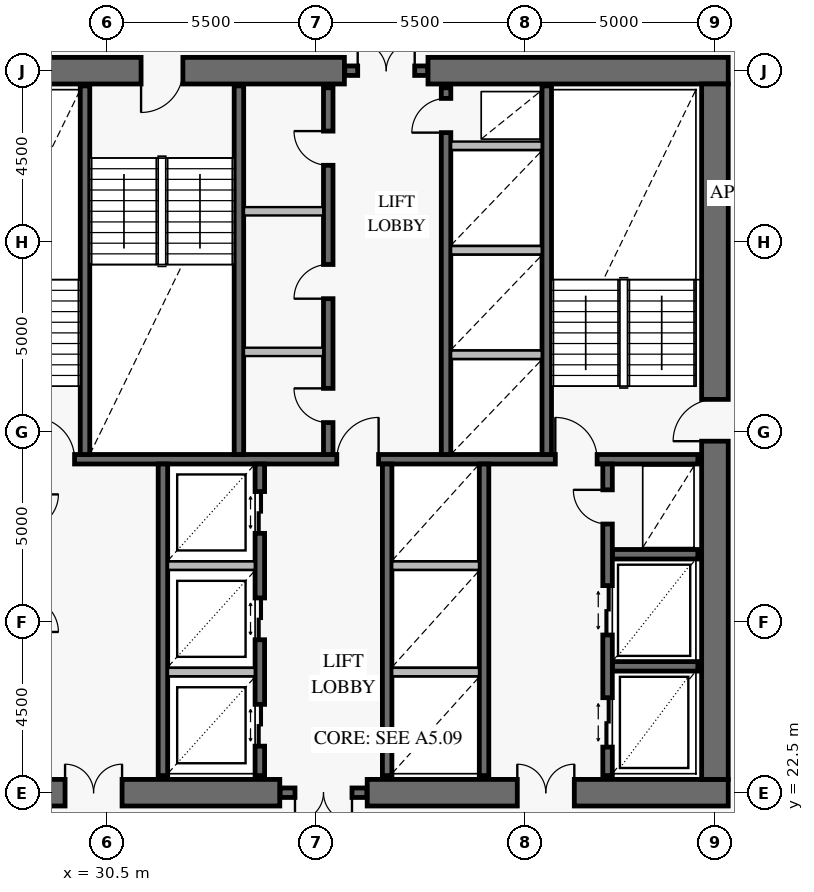
"""IFC4 building model, lengths in metres.
Left out: names, types, materials, properties, quantities, classifications, styles, units other than length and angle.
Written with IfcOpenShell. Run it as: python <this file> out.ifc"""

import sys

from ifc_helpers import new_model, si_unit, direction, frame, frame_2d, origin, place, context, subcontext, project, spatial, rectangle, extrude, element, fill, save


model = new_model("IFC4")
c1 = context("Model", 3, precision=1e-05, world=origin(), true_north=direction((0.0, 1.0)))
c2 = subcontext(c1, "Body", "Model", "MODEL_VIEW")
j1 = project(units=[si_unit("LENGTHUNIT", "METRE"), si_unit("PLANEANGLEUNIT", "RADIAN")], contexts=[c1])
p1 = place(None, origin())
s1 = spatial("IfcSite", under=j1, at=p1, CompositionType="ELEMENT")
p2 = place(p1, origin())
s2 = spatial("IfcBuilding", under=s1, at=p2, CompositionType="ELEMENT")
p3 = place(p2, frame((0.0, 0.0, 103.8)))
s3 = spatial("IfcBuildingStorey", under=s2, at=p3, CompositionType="ELEMENT", Elevation=103.8)
p4 = place(p3, frame((25.15, 22.5, 0.0), z_axis=(0.0, 0.0, 1.0), x_axis=(1.0, 0.0, 0.0)))
e1 = element("IfcWall", 1, at=p4, inside=s3, PredefinedType="SHEAR", context=c2, shape_type="SweptSolid", body=[
    extrude(rectangle(XDim=9.9, YDim=0.7, at=frame_2d((4.95, 0.0))), origin(), (0.0, 0.0, 1.0), 3.8),
])
p5 = place(p4, frame((4.25, 0.0, 0.0)))
e2 = element("IfcOpeningElement", 2, at=p5, cuts=e1, PredefinedType="OPENING", context=c2, shape_type="SweptSolid", body=[
    extrude(rectangle(XDim=1.5, YDim=2.15, at=frame_2d((0.75, 1.075))), frame((0.0, 0.362, 0.0), z_axis=(0.0, -1.0, 0.0), x_axis=(1.0, 0.0, 0.0)), (0.0, 0.0, 1.0), 0.724),
])
p6 = place(p3, frame((37.35, 22.5, 0.0), z_axis=(0.0, 0.0, 1.0), x_axis=(1.0, 0.0, 0.0)))
e3 = element("IfcWall", 3, at=p6, inside=s3, PredefinedType="SHEAR", context=c2, shape_type="SweptSolid", body=[
    extrude(rectangle(XDim=9.5, YDim=0.7, at=frame_2d((4.75, 0.0))), origin(), (0.0, 0.0, 1.0), 3.8),
])
p7 = place(p6, frame((3.95, 0.0, 0.0)))
e4 = element("IfcOpeningElement", 4, at=p7, cuts=e3, PredefinedType="OPENING", context=c2, shape_type="SweptSolid", body=[
    extrude(rectangle(XDim=1.5, YDim=2.15, at=frame_2d((0.75, 1.075))), frame((0.0, 0.362, 0.0), z_axis=(0.0, -1.0, 0.0), x_axis=(1.0, 0.0, 0.0)), (0.0, 0.0, 1.0), 0.724),
])
p8 = place(p3, frame((46.85, 41.5, 0.0), z_axis=(0.0, 0.0, 1.0), x_axis=(-1.0, 0.0, 0.0)))
e5 = element("IfcWall", 5, at=p8, inside=s3, PredefinedType="SHEAR", context=c2, shape_type="SweptSolid", body=[
    extrude(rectangle(XDim=7.9, YDim=0.7, at=frame_2d((3.95, 0.0))), origin(), (0.0, 0.0, 1.0), 3.8),
])
p9 = place(p3, frame((36.75, 41.5, 0.0), z_axis=(0.0, 0.0, 1.0), x_axis=(-1.0, 0.0, 0.0)))
e6 = element("IfcWall", 6, at=p9, inside=s3, PredefinedType="SHEAR", context=c2, shape_type="SweptSolid", body=[
    extrude(rectangle(XDim=11.6, YDim=0.7, at=frame_2d((5.8, 0.0))), origin(), (0.0, 0.0, 1.0), 3.8),
])
p10 = place(p9, frame((4.25, 0.0, 0.0)))
e7 = element("IfcOpeningElement", 7, at=p10, cuts=e6, PredefinedType="OPENING", context=c2, shape_type="SweptSolid", body=[
    extrude(rectangle(XDim=1.1, YDim=2.15, at=frame_2d((0.55, 1.075))), frame((0.0, 0.362, 0.0), z_axis=(0.0, -1.0, 0.0), x_axis=(1.0, 0.0, 0.0)), (0.0, 0.0, 1.0), 0.724),
])
p11 = place(p3, frame((46.5, 22.85, 0.0), z_axis=(0.0, 0.0, 1.0), x_axis=(0.0, 1.0, 0.0)))
e8 = element("IfcWall", 8, at=p11, inside=s3, PredefinedType="SHEAR", context=c2, shape_type="SweptSolid", body=[
    extrude(rectangle(XDim=18.3, YDim=0.7, at=frame_2d((9.15, 0.0))), origin(), (0.0, 0.0, 1.0), 3.8),
])
p12 = place(p11, frame((8.9, 0.0, 0.0)))
e9 = element("IfcOpeningElement", 9, at=p12, cuts=e8, PredefinedType="OPENING", context=c2, shape_type="SweptSolid", body=[
    extrude(rectangle(XDim=1.1, YDim=2.15, at=frame_2d((0.55, 1.075))), frame((0.0, 0.362, 0.0), z_axis=(0.0, -1.0, 0.0), x_axis=(1.0, 0.0, 0.0)), (0.0, 0.0, 1.0), 0.724),
])
p13 = place(p3, frame((35.06, 22.5, 0.0), z_axis=(0.0, 0.0, 1.0), x_axis=(1.0, 0.0, 0.0)))
e10 = element("IfcWall", 10, at=p13, inside=s3, PredefinedType="SOLIDWALL", context=c2, shape_type="SweptSolid", body=[
    extrude(rectangle(XDim=2.28, YDim=0.25, at=frame_2d((1.14, 0.0))), origin(), (0.0, 0.0, 1.0), 3.8),
])
p14 = place(p13, frame((0.39, 0.0, 0.0)))
e11 = element("IfcOpeningElement", 11, at=p14, cuts=e10, PredefinedType="OPENING", context=c2, shape_type="SweptSolid", body=[
    extrude(rectangle(XDim=1.5, YDim=2.15, at=frame_2d((0.75, 1.075))), frame((0.0, 0.137, 0.0), z_axis=(0.0, -1.0, 0.0), x_axis=(1.0, 0.0, 0.0)), (0.0, 0.0, 1.0), 0.274),
])
p15 = place(p3, frame((36.76, 41.5, 0.0), z_axis=(0.0, 0.0, 1.0), x_axis=(1.0, 0.0, 0.0)))
e12 = element("IfcWall", 12, at=p15, inside=s3, PredefinedType="SOLIDWALL", context=c2, shape_type="SweptSolid", body=[
    extrude(rectangle(XDim=2.18, YDim=0.25, at=frame_2d((1.09, 0.0))), origin(), (0.0, 0.0, 1.0), 3.8),
])
p16 = place(p15, frame((0.34, 0.0, 0.0)))
e13 = element("IfcOpeningElement", 13, at=p16, cuts=e12, PredefinedType="OPENING", context=c2, shape_type="SweptSolid", body=[
    extrude(rectangle(XDim=1.5, YDim=2.15, at=frame_2d((0.75, 1.075))), frame((0.0, 0.137, 0.0), z_axis=(0.0, -1.0, 0.0), x_axis=(1.0, 0.0, 0.0)), (0.0, 0.0, 1.0), 0.274),
])
p17 = place(p3, frame((25.95, 31.275, 0.0), z_axis=(0.0, 0.0, 1.0), x_axis=(1.0, 0.0, 0.0)))
e14 = element("IfcWall", 14, at=p17, inside=s3, PredefinedType="SOLIDWALL", context=c2, shape_type="SweptSolid", body=[
    extrude(rectangle(XDim=20.1, YDim=0.25, at=frame_2d((10.05, 0.0))), origin(), (0.0, 0.0, 1.0), 3.8),
])
p18 = place(p17, frame((2.6, 0.0, 0.0)))
e15 = element("IfcOpeningElement", 15, at=p18, cuts=e14, PredefinedType="OPENING", context=c2, shape_type="SweptSolid", body=[
    extrude(rectangle(XDim=1.1, YDim=2.15, at=frame_2d((0.55, 1.075))), frame((0.0, 0.137, 0.0), z_axis=(0.0, -1.0, 0.0), x_axis=(1.0, 0.0, 0.0)), (0.0, 0.0, 1.0), 0.274),
])
p19 = place(p17, frame((10.6, 0.0, 0.0)))
e16 = element("IfcOpeningElement", 16, at=p19, cuts=e14, PredefinedType="OPENING", context=c2, shape_type="SweptSolid", body=[
    extrude(rectangle(XDim=1.1, YDim=2.15, at=frame_2d((0.55, 1.075))), frame((0.0, 0.137, 0.0), z_axis=(0.0, -1.0, 0.0), x_axis=(1.0, 0.0, 0.0)), (0.0, 0.0, 1.0), 0.274),
])
p20 = place(p17, frame((16.35, 0.0, 0.0)))
e17 = element("IfcOpeningElement", 17, at=p20, cuts=e14, PredefinedType="OPENING", context=c2, shape_type="SweptSolid", body=[
    extrude(rectangle(XDim=1.1, YDim=2.15, at=frame_2d((0.55, 1.075))), frame((0.0, 0.137, 0.0), z_axis=(0.0, -1.0, 0.0), x_axis=(1.0, 0.0, 0.0)), (0.0, 0.0, 1.0), 0.274),
])
for number, where, z_axis, x_axis in (
    (18, (29.925, 31.4, 0.0), (0.0, 0.0, 1.0), (0.0, 1.0, 0.0)),
    (19, (33.975, 31.4, 0.0), (0.0, 0.0, 1.0), (0.0, 1.0, 0.0)),
    (20, (42.075, 31.4, 0.0), (0.0, 0.0, 1.0), (0.0, 1.0, 0.0)),
):
    element("IfcWall", number, at=place(p3, frame(where, z_axis=z_axis, x_axis=x_axis)), inside=s3, PredefinedType="SOLIDWALL", context=c2, shape_type="SweptSolid", body=[
        extrude(rectangle(XDim=9.7, YDim=0.25, at=frame_2d((4.85, 0.0))), origin(), (0.0, 0.0, 1.0), 3.8),
    ])
p21 = place(p3, frame((36.325, 31.4, 0.0), z_axis=(0.0, 0.0, 1.0), x_axis=(0.0, 1.0, 0.0)))
e21 = element("IfcWall", 21, at=p21, inside=s3, PredefinedType="SOLIDWALL", context=c2, shape_type="SweptSolid", body=[
    extrude(rectangle(XDim=9.65, YDim=0.25, at=frame_2d((4.825, 0.0))), origin(), (0.0, 0.0, 1.0), 3.8),
])
p22 = place(p21, frame((0.84, 0.0, 0.0)))
e22 = element("IfcOpeningElement", 22, at=p22, cuts=e21, PredefinedType="OPENING", context=c2, shape_type="SweptSolid", body=[
    extrude(rectangle(XDim=0.9, YDim=2.1, at=frame_2d((0.45, 1.05))), frame((0.0, 0.137, 0.0), z_axis=(0.0, -1.0, 0.0), x_axis=(1.0, 0.0, 0.0)), (0.0, 0.0, 1.0), 0.274),
])
p23 = place(p21, frame((4.1, 0.0, 0.0)))
e23 = element("IfcOpeningElement", 23, at=p23, cuts=e21, PredefinedType="OPENING", context=c2, shape_type="SweptSolid", body=[
    extrude(rectangle(XDim=0.9, YDim=2.1, at=frame_2d((0.45, 1.05))), frame((0.0, 0.137, 0.0), z_axis=(0.0, -1.0, 0.0), x_axis=(1.0, 0.0, 0.0)), (0.0, 0.0, 1.0), 0.274),
])
p24 = place(p21, frame((7.61, 0.0, 0.0)))
e24 = element("IfcOpeningElement", 24, at=p24, cuts=e21, PredefinedType="OPENING", context=c2, shape_type="SweptSolid", body=[
    extrude(rectangle(XDim=0.9, YDim=2.1, at=frame_2d((0.45, 1.05))), frame((0.0, 0.137, 0.0), z_axis=(0.0, -1.0, 0.0), x_axis=(1.0, 0.0, 0.0)), (0.0, 0.0, 1.0), 0.274),
])
p25 = place(p3, frame((39.425, 31.4, 0.0), z_axis=(0.0, 0.0, 1.0), x_axis=(0.0, 1.0, 0.0)))
e25 = element("IfcWall", 25, at=p25, inside=s3, PredefinedType="SOLIDWALL", context=c2, shape_type="SweptSolid", body=[
    extrude(rectangle(XDim=9.65, YDim=0.25, at=frame_2d((4.825, 0.0))), origin(), (0.0, 0.0, 1.0), 3.8),
])
p26 = place(p25, frame((8.47, 0.0, 0.0)))
e26 = element("IfcOpeningElement", 26, at=p26, cuts=e25, PredefinedType="OPENING", context=c2, shape_type="SweptSolid", body=[
    extrude(rectangle(XDim=0.9, YDim=2.1, at=frame_2d((0.45, 1.05))), frame((0.0, 0.137, 0.0), z_axis=(0.0, -1.0, 0.0), x_axis=(1.0, 0.0, 0.0)), (0.0, 0.0, 1.0), 0.274),
])
p27 = place(p3, frame((31.975, 22.95, 0.0), z_axis=(0.0, 0.0, 1.0), x_axis=(0.0, 1.0, 0.0)))
e27 = element("IfcWall", 27, at=p27, inside=s3, PredefinedType="SOLIDWALL", context=c2, shape_type="SweptSolid", body=[
    extrude(rectangle(XDim=8.2, YDim=0.25, at=frame_2d((4.1, 0.0))), origin(), (0.0, 0.0, 1.0), 3.8),
])
p28 = place(p3, frame((34.525, 22.95, 0.0), z_axis=(0.0, 0.0, 1.0), x_axis=(0.0, 1.0, 0.0)))
e28 = element("IfcWall", 28, at=p28, inside=s3, PredefinedType="SOLIDWALL", context=c2, shape_type="SweptSolid", body=[
    extrude(rectangle(XDim=8.2, YDim=0.25, at=frame_2d((4.1, 0.0))), origin(), (0.0, 0.0, 1.0), 3.8),
])
p29 = place(p28, frame((0.775, 0.0, 0.0)))
e29 = element("IfcOpeningElement", 29, at=p29, cuts=e28, PredefinedType="OPENING", context=c2, shape_type="SweptSolid", body=[
    extrude(rectangle(XDim=1.1, YDim=2.2, at=frame_2d((0.55, 1.1))), frame((0.0, 0.137, 0.0), z_axis=(0.0, -1.0, 0.0), x_axis=(1.0, 0.0, 0.0)), (0.0, 0.0, 1.0), 0.274),
])
p30 = place(p28, frame((3.575, 0.0, 0.0)))
e30 = element("IfcOpeningElement", 30, at=p30, cuts=e28, PredefinedType="OPENING", context=c2, shape_type="SweptSolid", body=[
    extrude(rectangle(XDim=1.1, YDim=2.2, at=frame_2d((0.55, 1.1))), frame((0.0, 0.137, 0.0), z_axis=(0.0, -1.0, 0.0), x_axis=(1.0, 0.0, 0.0)), (0.0, 0.0, 1.0), 0.274),
])
p31 = place(p28, frame((6.375, 0.0, 0.0)))
e31 = element("IfcOpeningElement", 31, at=p31, cuts=e28, PredefinedType="OPENING", context=c2, shape_type="SweptSolid", body=[
    extrude(rectangle(XDim=1.1, YDim=2.2, at=frame_2d((0.55, 1.1))), frame((0.0, 0.137, 0.0), z_axis=(0.0, -1.0, 0.0), x_axis=(1.0, 0.0, 0.0)), (0.0, 0.0, 1.0), 0.274),
])
for number, where, z_axis, x_axis in (
    (32, (37.875, 22.95, 0.0), (0.0, 0.0, 1.0), (0.0, 1.0, 0.0)),
    (33, (40.425, 22.95, 0.0), (0.0, 0.0, 1.0), (0.0, 1.0, 0.0)),
):
    element("IfcWall", number, at=place(p3, frame(where, z_axis=z_axis, x_axis=x_axis)), inside=s3, PredefinedType="SOLIDWALL", context=c2, shape_type="SweptSolid", body=[
        extrude(rectangle(XDim=8.2, YDim=0.25, at=frame_2d((4.1, 0.0))), origin(), (0.0, 0.0, 1.0), 3.8),
    ])
for number, where, z_axis, x_axis in (
    (34, (43.8, 25.825, 0.0), (0.0, 0.0, 1.0), (1.0, 0.0, 0.0)),
    (35, (43.8, 28.775, 0.0), (0.0, 0.0, 1.0), (1.0, 0.0, 0.0)),
):
    element("IfcWall", number, at=place(p3, frame(where, z_axis=z_axis, x_axis=x_axis)), inside=s3, PredefinedType="SOLIDWALL", context=c2, shape_type="SweptSolid", body=[
        extrude(rectangle(XDim=2.25, YDim=0.25, at=frame_2d((1.125, 0.0))), origin(), (0.0, 0.0, 1.0), 3.8),
    ])
p32 = place(p3, frame((43.675, 22.95, 0.0), z_axis=(0.0, 0.0, 1.0), x_axis=(0.0, 1.0, 0.0)))
e36 = element("IfcWall", 36, at=p32, inside=s3, PredefinedType="SOLIDWALL", context=c2, shape_type="SweptSolid", body=[
    extrude(rectangle(XDim=8.2, YDim=0.25, at=frame_2d((4.1, 0.0))), origin(), (0.0, 0.0, 1.0), 3.8),
])
p33 = place(p32, frame((0.75, 0.0, 0.0)))
e37 = element("IfcOpeningElement", 37, at=p33, cuts=e36, PredefinedType="OPENING", context=c2, shape_type="SweptSolid", body=[
    extrude(rectangle(XDim=1.3, YDim=2.3, at=frame_2d((0.65, 1.15))), frame((0.0, 0.137, 0.0), z_axis=(0.0, -1.0, 0.0), x_axis=(1.0, 0.0, 0.0)), (0.0, 0.0, 1.0), 0.274),
])
p34 = place(p32, frame((3.7, 0.0, 0.0)))
e38 = element("IfcOpeningElement", 38, at=p34, cuts=e36, PredefinedType="OPENING", context=c2, shape_type="SweptSolid", body=[
    extrude(rectangle(XDim=1.3, YDim=2.3, at=frame_2d((0.65, 1.15))), frame((0.0, 0.137, 0.0), z_axis=(0.0, -1.0, 0.0), x_axis=(1.0, 0.0, 0.0)), (0.0, 0.0, 1.0), 0.274),
])
p35 = place(p32, frame((6.62, 0.0, 0.0)))
e39 = element("IfcOpeningElement", 39, at=p35, cuts=e36, PredefinedType="OPENING", context=c2, shape_type="SweptSolid", body=[
    extrude(rectangle(XDim=0.9, YDim=2.1, at=frame_2d((0.45, 1.05))), frame((0.0, 0.137, 0.0), z_axis=(0.0, -1.0, 0.0), x_axis=(1.0, 0.0, 0.0)), (0.0, 0.0, 1.0), 0.274),
])
for number, where, z_axis, x_axis in (
    (40, (34.108, 34.1, 0.0), (0.0, 0.0, 1.0), (1.0, 0.0, 0.0)),
    (41, (34.108, 37.8, 0.0), (0.0, 0.0, 1.0), (1.0, 0.0, 0.0)),
):
    element("IfcWall", number, at=place(p3, frame(where, z_axis=z_axis, x_axis=x_axis)), inside=s3, PredefinedType="PARTITIONING", context=c2, shape_type="SweptSolid", body=[
        extrude(rectangle(XDim=2.084, YDim=0.22, at=frame_2d((1.042, 0.0))), origin(), (0.0, 0.0, 1.0), 3.55),
    ])
for number, where, z_axis, x_axis in (
    (42, (39.558, 34.025, 0.0), (0.0, 0.0, 1.0), (1.0, 0.0, 0.0)),
    (43, (39.558, 36.775, 0.0), (0.0, 0.0, 1.0), (1.0, 0.0, 0.0)),
    (44, (39.558, 39.525, 0.0), (0.0, 0.0, 1.0), (1.0, 0.0, 0.0)),
):
    element("IfcWall", number, at=place(p3, frame(where, z_axis=z_axis, x_axis=x_axis)), inside=s3, PredefinedType="PARTITIONING", context=c2, shape_type="SweptSolid", body=[
        extrude(rectangle(XDim=2.384, YDim=0.22, at=frame_2d((1.192, 0.0))), origin(), (0.0, 0.0, 1.0), 3.55),
    ])
for number, where, z_axis, x_axis in (
    (45, (32.108, 25.675, 0.0), (0.0, 0.0, 1.0), (1.0, 0.0, 0.0)),
    (46, (32.108, 28.475, 0.0), (0.0, 0.0, 1.0), (1.0, 0.0, 0.0)),
):
    element("IfcWall", number, at=place(p3, frame(where, z_axis=z_axis, x_axis=x_axis)), inside=s3, PredefinedType="PARTITIONING", context=c2, shape_type="SweptSolid", body=[
        extrude(rectangle(XDim=2.284, YDim=0.22, at=frame_2d((1.142, 0.0))), origin(), (0.0, 0.0, 1.0), 3.55),
    ])
for number, where, z_axis, x_axis in (
    (47, (38.008, 25.675, 0.0), (0.0, 0.0, 1.0), (1.0, 0.0, 0.0)),
    (48, (38.008, 28.475, 0.0), (0.0, 0.0, 1.0), (1.0, 0.0, 0.0)),
):
    element("IfcWall", number, at=place(p3, frame(where, z_axis=z_axis, x_axis=x_axis)), inside=s3, PredefinedType="PARTITIONING", context=c2, shape_type="SweptSolid", body=[
        extrude(rectangle(XDim=2.284, YDim=0.22, at=frame_2d((1.142, 0.0))), origin(), (0.0, 0.0, 1.0), 3.55),
    ])
p36 = place(p12, origin())
e49 = element("IfcDoor", 49, at=p36, inside=s3, OperationType="SINGLE_SWING_LEFT", PredefinedType="USERDEFINED", context=c2, shape_type="SweptSolid", body=[
    extrude(rectangle(XDim=1.1, YDim=2.15, at=frame_2d((0.55, 1.075))), frame((0.0, 0.025, 0.0), z_axis=(0.0, -1.0, 0.0), x_axis=(1.0, 0.0, 0.0)), (0.0, 0.0, 1.0), 0.05),
])
fill(e9, e49)
p37 = place(p10, origin())
e50 = element("IfcDoor", 50, at=p37, inside=s3, OperationType="SINGLE_SWING_RIGHT", PredefinedType="USERDEFINED", context=c2, shape_type="SweptSolid", body=[
    extrude(rectangle(XDim=1.1, YDim=2.15, at=frame_2d((0.55, 1.075))), frame((0.0, 0.025, 0.0), z_axis=(0.0, -1.0, 0.0), x_axis=(1.0, 0.0, 0.0)), (0.0, 0.0, 1.0), 0.05),
])
fill(e7, e50)
p38 = place(p5, origin())
e51 = element("IfcDoor", 51, at=p38, inside=s3, OperationType="DOUBLE_DOOR_SINGLE_SWING", PredefinedType="DOOR", context=c2, shape_type="SweptSolid", body=[
    extrude(rectangle(XDim=1.5, YDim=2.15, at=frame_2d((0.75, 1.075))), frame((0.0, 0.025, 0.0), z_axis=(0.0, -1.0, 0.0), x_axis=(1.0, 0.0, 0.0)), (0.0, 0.0, 1.0), 0.05),
])
fill(e2, e51)
p39 = place(p7, origin())
e52 = element("IfcDoor", 52, at=p39, inside=s3, OperationType="DOUBLE_DOOR_SINGLE_SWING", PredefinedType="DOOR", context=c2, shape_type="SweptSolid", body=[
    extrude(rectangle(XDim=1.5, YDim=2.15, at=frame_2d((0.75, 1.075))), frame((0.0, 0.025, 0.0), z_axis=(0.0, -1.0, 0.0), x_axis=(1.0, 0.0, 0.0)), (0.0, 0.0, 1.0), 0.05),
])
fill(e4, e52)
p40 = place(p14, frame((1.5, 0.0, 0.0), z_axis=(0.0, 0.0, 1.0), x_axis=(-1.0, 0.0, 0.0)))
e53 = element("IfcDoor", 53, at=p40, inside=s3, OperationType="DOUBLE_DOOR_SINGLE_SWING", PredefinedType="DOOR", context=c2, shape_type="SweptSolid", body=[
    extrude(rectangle(XDim=1.5, YDim=2.15, at=frame_2d((0.75, 1.075))), frame((0.0, 0.025, 0.0), z_axis=(0.0, -1.0, 0.0), x_axis=(1.0, 0.0, 0.0)), (0.0, 0.0, 1.0), 0.05),
])
fill(e11, e53)
p41 = place(p16, origin())
e54 = element("IfcDoor", 54, at=p41, inside=s3, OperationType="DOUBLE_DOOR_SINGLE_SWING", PredefinedType="DOOR", context=c2, shape_type="SweptSolid", body=[
    extrude(rectangle(XDim=1.5, YDim=2.15, at=frame_2d((0.75, 1.075))), frame((0.0, 0.025, 0.0), z_axis=(0.0, -1.0, 0.0), x_axis=(1.0, 0.0, 0.0)), (0.0, 0.0, 1.0), 0.05),
])
fill(e13, e54)
p42 = place(p18, origin())
e55 = element("IfcDoor", 55, at=p42, inside=s3, OperationType="SINGLE_SWING_LEFT", PredefinedType="USERDEFINED", context=c2, shape_type="SweptSolid", body=[
    extrude(rectangle(XDim=1.1, YDim=2.15, at=frame_2d((0.55, 1.075))), frame((0.0, 0.025, 0.0), z_axis=(0.0, -1.0, 0.0), x_axis=(1.0, 0.0, 0.0)), (0.0, 0.0, 1.0), 0.05),
])
fill(e15, e55)
p43 = place(p19, origin())
e56 = element("IfcDoor", 56, at=p43, inside=s3, OperationType="SINGLE_SWING_RIGHT", PredefinedType="USERDEFINED", context=c2, shape_type="SweptSolid", body=[
    extrude(rectangle(XDim=1.1, YDim=2.15, at=frame_2d((0.55, 1.075))), frame((0.0, 0.025, 0.0), z_axis=(0.0, -1.0, 0.0), x_axis=(1.0, 0.0, 0.0)), (0.0, 0.0, 1.0), 0.05),
])
fill(e16, e56)
p44 = place(p20, origin())
e57 = element("IfcDoor", 57, at=p44, inside=s3, OperationType="SINGLE_SWING_LEFT", PredefinedType="USERDEFINED", context=c2, shape_type="SweptSolid", body=[
    extrude(rectangle(XDim=1.1, YDim=2.15, at=frame_2d((0.55, 1.075))), frame((0.0, 0.025, 0.0), z_axis=(0.0, -1.0, 0.0), x_axis=(1.0, 0.0, 0.0)), (0.0, 0.0, 1.0), 0.05),
])
fill(e17, e57)
p45 = place(p22, origin())
e58 = element("IfcDoor", 58, at=p45, inside=s3, OperationType="SINGLE_SWING_RIGHT", PredefinedType="DOOR", context=c2, shape_type="SweptSolid", body=[
    extrude(rectangle(XDim=0.9, YDim=2.1, at=frame_2d((0.45, 1.05))), frame((0.0, 0.025, 0.0), z_axis=(0.0, -1.0, 0.0), x_axis=(1.0, 0.0, 0.0)), (0.0, 0.0, 1.0), 0.05),
])
fill(e22, e58)
p46 = place(p23, origin())
e59 = element("IfcDoor", 59, at=p46, inside=s3, OperationType="SINGLE_SWING_LEFT", PredefinedType="DOOR", context=c2, shape_type="SweptSolid", body=[
    extrude(rectangle(XDim=0.9, YDim=2.1, at=frame_2d((0.45, 1.05))), frame((0.0, 0.025, 0.0), z_axis=(0.0, -1.0, 0.0), x_axis=(1.0, 0.0, 0.0)), (0.0, 0.0, 1.0), 0.05),
])
fill(e23, e59)
p47 = place(p24, origin())
e60 = element("IfcDoor", 60, at=p47, inside=s3, OperationType="SINGLE_SWING_RIGHT", PredefinedType="DOOR", context=c2, shape_type="SweptSolid", body=[
    extrude(rectangle(XDim=0.9, YDim=2.1, at=frame_2d((0.45, 1.05))), frame((0.0, 0.025, 0.0), z_axis=(0.0, -1.0, 0.0), x_axis=(1.0, 0.0, 0.0)), (0.0, 0.0, 1.0), 0.05),
])
fill(e24, e60)
p48 = place(p26, origin())
e61 = element("IfcDoor", 61, at=p48, inside=s3, OperationType="SINGLE_SWING_LEFT", PredefinedType="DOOR", context=c2, shape_type="SweptSolid", body=[
    extrude(rectangle(XDim=0.9, YDim=2.1, at=frame_2d((0.45, 1.05))), frame((0.0, 0.025, 0.0), z_axis=(0.0, -1.0, 0.0), x_axis=(1.0, 0.0, 0.0)), (0.0, 0.0, 1.0), 0.05),
])
fill(e26, e61)
p49 = place(p29, frame((1.1, 0.0, 0.0), z_axis=(0.0, 0.0, 1.0), x_axis=(-1.0, 0.0, 0.0)))
e62 = element("IfcDoor", 62, at=p49, inside=s3, OperationType="DOUBLE_DOOR_SLIDING", PredefinedType="DOOR", context=c2, shape_type="SweptSolid", body=[
    extrude(rectangle(XDim=1.1, YDim=2.2, at=frame_2d((0.55, 1.1))), frame((0.0, 0.025, 0.0), z_axis=(0.0, -1.0, 0.0), x_axis=(1.0, 0.0, 0.0)), (0.0, 0.0, 1.0), 0.05),
])
fill(e29, e62)
p50 = place(p30, frame((1.1, 0.0, 0.0), z_axis=(0.0, 0.0, 1.0), x_axis=(-1.0, 0.0, 0.0)))
e63 = element("IfcDoor", 63, at=p50, inside=s3, OperationType="DOUBLE_DOOR_SLIDING", PredefinedType="DOOR", context=c2, shape_type="SweptSolid", body=[
    extrude(rectangle(XDim=1.1, YDim=2.2, at=frame_2d((0.55, 1.1))), frame((0.0, 0.025, 0.0), z_axis=(0.0, -1.0, 0.0), x_axis=(1.0, 0.0, 0.0)), (0.0, 0.0, 1.0), 0.05),
])
fill(e30, e63)
p51 = place(p31, frame((1.1, 0.0, 0.0), z_axis=(0.0, 0.0, 1.0), x_axis=(-1.0, 0.0, 0.0)))
e64 = element("IfcDoor", 64, at=p51, inside=s3, OperationType="DOUBLE_DOOR_SLIDING", PredefinedType="DOOR", context=c2, shape_type="SweptSolid", body=[
    extrude(rectangle(XDim=1.1, YDim=2.2, at=frame_2d((0.55, 1.1))), frame((0.0, 0.025, 0.0), z_axis=(0.0, -1.0, 0.0), x_axis=(1.0, 0.0, 0.0)), (0.0, 0.0, 1.0), 0.05),
])
fill(e31, e64)
p52 = place(p33, origin())
e65 = element("IfcDoor", 65, at=p52, inside=s3, OperationType="DOUBLE_DOOR_SLIDING", PredefinedType="DOOR", context=c2, shape_type="SweptSolid", body=[
    extrude(rectangle(XDim=1.3, YDim=2.3, at=frame_2d((0.65, 1.15))), frame((0.0, 0.025, 0.0), z_axis=(0.0, -1.0, 0.0), x_axis=(1.0, 0.0, 0.0)), (0.0, 0.0, 1.0), 0.05),
])
fill(e37, e65)
p53 = place(p34, origin())
e66 = element("IfcDoor", 66, at=p53, inside=s3, OperationType="DOUBLE_DOOR_SLIDING", PredefinedType="DOOR", context=c2, shape_type="SweptSolid", body=[
    extrude(rectangle(XDim=1.3, YDim=2.3, at=frame_2d((0.65, 1.15))), frame((0.0, 0.025, 0.0), z_axis=(0.0, -1.0, 0.0), x_axis=(1.0, 0.0, 0.0)), (0.0, 0.0, 1.0), 0.05),
])
fill(e38, e66)
p54 = place(p35, origin())
e67 = element("IfcDoor", 67, at=p54, inside=s3, OperationType="SINGLE_SWING_RIGHT", PredefinedType="DOOR", context=c2, shape_type="SweptSolid", body=[
    extrude(rectangle(XDim=0.9, YDim=2.1, at=frame_2d((0.45, 1.05))), frame((0.0, 0.025, 0.0), z_axis=(0.0, -1.0, 0.0), x_axis=(1.0, 0.0, 0.0)), (0.0, 0.0, 1.0), 0.05),
])
fill(e39, e67)
save(model, sys.argv[1])
